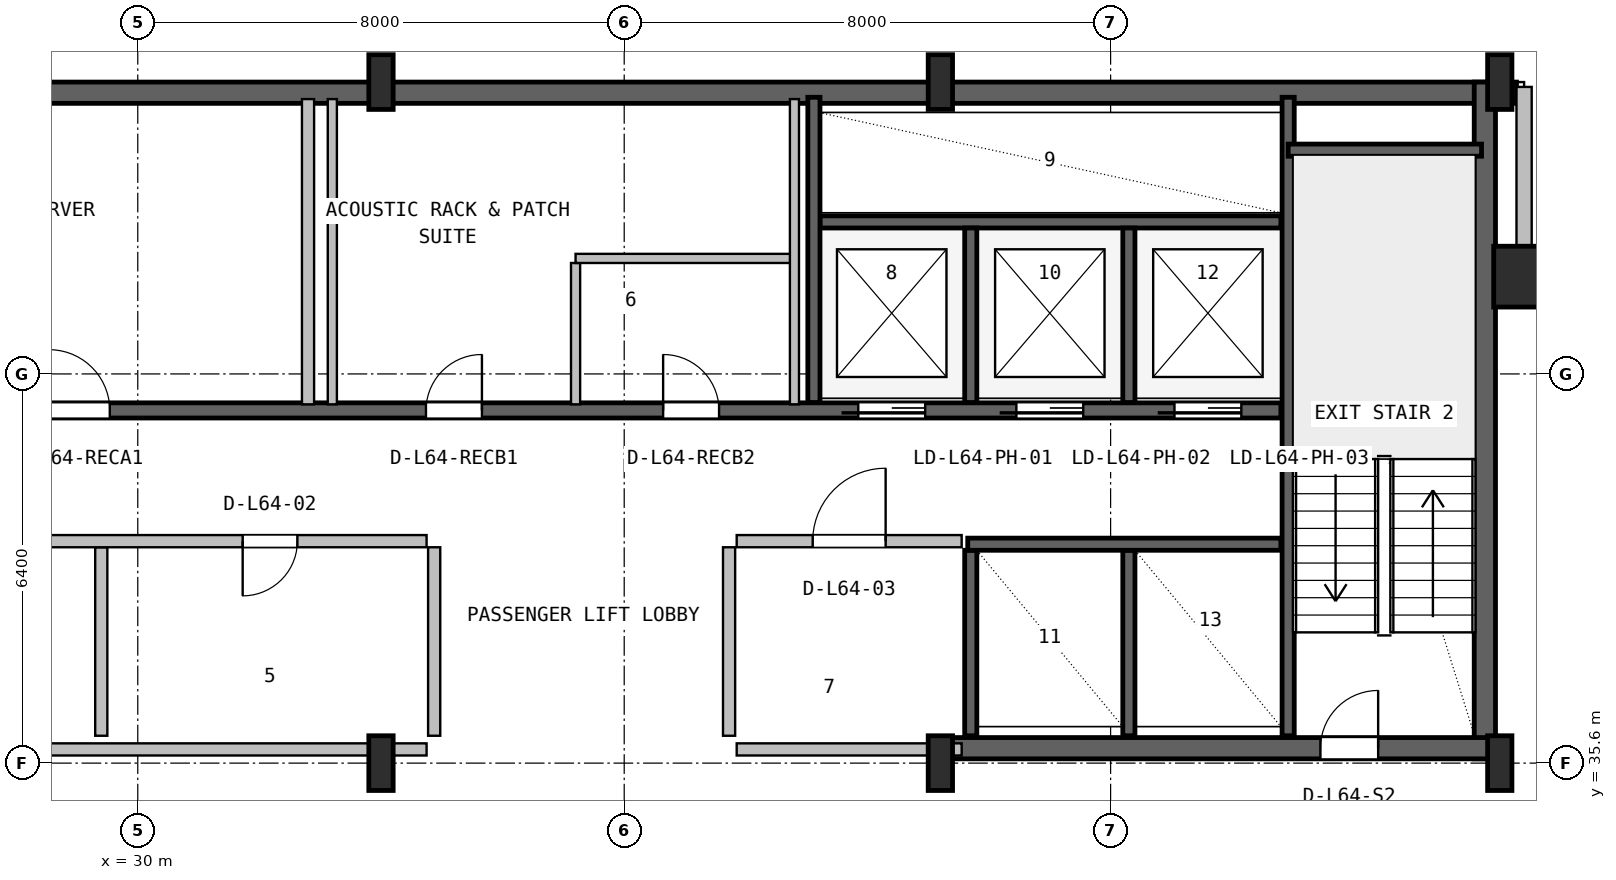
"""IFC4 building model, lengths in metres.
Left out: names, types, materials, properties, quantities, classifications, styles, units other than length and angle.
Written with IfcOpenShell. Run it as: python <this file> out.ifc"""

import sys

from ifc_helpers import new_model, si_unit, direction, frame, frame_2d, origin, origin_2d, place, context, subcontext, project, spatial, rectangle, hollow_rectangle, i_section, extrude, source, transform, mapped, element, fill, save


model = new_model("IFC4")
c1 = context("Model", 3, precision=1e-05, world=origin(), true_north=direction((0.0, 1.0)))
c2 = subcontext(c1, "Body", "Model", "MODEL_VIEW")
j1 = project(units=[si_unit("LENGTHUNIT", "METRE"), si_unit("PLANEANGLEUNIT", "RADIAN")], contexts=[c1])
p1 = place(None, origin())
s1 = spatial("IfcSite", under=j1, at=p1, CompositionType="ELEMENT")
p2 = place(p1, origin())
s2 = spatial("IfcBuilding", under=s1, at=p2, CompositionType="ELEMENT")
p3 = place(p2, frame((0.0, 0.0, 258.4)))
s3 = spatial("IfcBuildingStorey", under=s2, at=p3, CompositionType="ELEMENT", Elevation=258.4)
p4 = place(p3, frame((15.325, 46.625, 0.0), z_axis=(0.0, 0.0, 1.0), x_axis=(1.0, 0.0, 0.0)))
e1 = element("IfcWall", 1, at=p4, inside=s3, PredefinedType="SHEAR", context=c2, shape_type="SweptSolid", body=[
    extrude(rectangle(XDim=37.35, YDim=0.35, at=frame_2d((18.675, 0.0))), origin(), (0.0, 0.0, 1.0), 3.55),
])
p5 = place(p3, frame((52.155, 35.67, 0.0), z_axis=(0.0, 0.0, 1.0), x_axis=(0.0, 1.0, 0.0)))
e2 = element("IfcWall", 2, at=p5, inside=s3, PredefinedType="SHEAR", context=c2, shape_type="SweptSolid", body=[
    extrude(rectangle(XDim=11.13, YDim=0.35, at=frame_2d((5.565, 0.0))), origin(), (0.0, 0.0, 1.0), 3.55),
])
p6 = place(p3, frame((43.2, 35.845, 0.0), z_axis=(0.0, 0.0, 1.0), x_axis=(1.0, 0.0, 0.0)))
e3 = element("IfcWall", 3, at=p6, inside=s3, PredefinedType="SHEAR", context=c2, shape_type="SweptSolid", body=[
    extrude(rectangle(XDim=9.13, YDim=0.35, at=frame_2d((4.565, 0.0))), origin(), (0.0, 0.0, 1.0), 3.55),
])
p7 = place(p6, frame((6.25, 0.0, 0.0)))
e4 = element("IfcOpeningElement", 4, at=p7, cuts=e3, PredefinedType="OPENING", context=c2, shape_type="SweptSolid", body=[
    extrude(rectangle(XDim=0.95, YDim=2.1, at=frame_2d((0.475, 1.05))), frame((0.0, 0.185, 0.0), z_axis=(0.0, -1.0, 0.0), x_axis=(1.0, 0.0, 0.0)), (0.0, 0.0, 1.0), 0.37),
])
m1 = source(origin(), c2, "Body", "SweptSolid", [
    extrude(i_section(OverallWidth=0.4, OverallDepth=0.9, WebThickness=0.016, FlangeThickness=0.028, FilletRadius=0.016, at=origin_2d()), origin(), (0.0, 0.0, 1.0), 3.8),
])
for number, where, z_axis, x_axis in (
    (5, (34.0, 35.6, 0.0), (0.0, 0.0, 1.0), (1.0, 0.0, 0.0)),
    (6, (34.0, 46.8, 0.0), (0.0, 0.0, 1.0), (1.0, 0.0, 0.0)),
    (7, (43.2, 35.6, 0.0), (0.0, 0.0, 1.0), (1.0, 0.0, 0.0)),
    (8, (43.2, 46.8, 0.0), (0.0, 0.0, 1.0), (1.0, 0.0, 0.0)),
    (9, (52.4, 35.6, 0.0), (0.0, 0.0, 1.0), (1.0, 0.0, 0.0)),
    (10, (52.4, 46.8, 0.0), (0.0, 0.0, 1.0), (1.0, 0.0, 0.0)),
):
    element("IfcColumn", number, at=place(p3, frame(where, z_axis=z_axis, x_axis=x_axis)), inside=s3, PredefinedType="COLUMN", context=c2, shape_type="MappedRepresentation", body=[
        mapped(m1, transform((0.0, 0.0, 0.0), x_axis=(1.0, 0.0, 0.0), y_axis=(0.0, 1.0, 0.0), z_axis=(0.0, 0.0, 1.0), scale=1.0)),
    ])
m2 = source(origin(), c2, "Body", "SweptSolid", [
    extrude(hollow_rectangle(XDim=1.0, YDim=1.0, WallThickness=0.04, at=origin_2d()), origin(), (0.0, 0.0, 1.0), 3.8),
])
p8 = place(p3, frame((52.8, 43.6, 0.0), z_axis=(0.0, 0.0, 1.0), x_axis=(1.0, 0.0, 0.0)))
e11 = element("IfcColumn", 11, at=p8, inside=s3, PredefinedType="COLUMN", context=c2, shape_type="MappedRepresentation", body=[
    mapped(m2, transform((0.0, 0.0, 0.0), x_axis=(1.0, 0.0, 0.0), y_axis=(0.0, 1.0, 0.0), z_axis=(0.0, 0.0, 1.0), scale=1.0)),
])
p9 = place(p3, frame((52.93, 43.6, 0.0), z_axis=(0.0, 0.0, 1.0), x_axis=(1.0, 0.0, 0.0)))
e12 = element("IfcWall", 12, at=p9, inside=s3, PredefinedType="SOLIDWALL", context=c2, shape_type="SweptSolid", body=[
    extrude(rectangle(XDim=2.99, YDim=0.25, at=frame_2d((1.495, 0.0))), origin(), (0.0, 0.0, 1.0), 3.53),
])
p10 = place(p3, frame((52.8, 43.52, 0.0), z_axis=(0.0, 0.0, 1.0), x_axis=(0.0, 1.0, 0.0)))
e13 = element("IfcWall", 13, at=p10, inside=s3, PredefinedType="SOLIDWALL", context=c2, shape_type="SweptSolid", body=[
    extrude(rectangle(XDim=3.2, YDim=0.25, at=frame_2d((1.6, 0.0))), origin(), (0.0, 0.0, 1.0), 3.171),
])
p11 = place(p3, frame((48.92, 36.05, 0.0), z_axis=(0.0, 0.0, 1.0), x_axis=(0.0, 1.0, 0.0)))
e14 = element("IfcWall", 14, at=p11, inside=s3, PredefinedType="SHEAR", context=c2, shape_type="SweptSolid", body=[
    extrude(rectangle(XDim=10.5, YDim=0.2, at=frame_2d((5.25, 0.0))), origin(), (0.0, 0.0, 1.0), 3.55),
])
p12 = place(p3, frame((48.92, 45.68, 0.0), z_axis=(0.0, 0.0, 1.0), x_axis=(1.0, 0.0, 0.0)))
e15 = element("IfcWall", 15, at=p12, inside=s3, PredefinedType="SHEAR", context=c2, shape_type="SweptSolid", body=[
    extrude(rectangle(XDim=3.18, YDim=0.2, at=frame_2d((1.59, 0.0))), origin(), (0.0, 0.0, 1.0), 3.55),
])
p13 = place(p3, frame((24.98, 41.4, 0.0), z_axis=(0.0, 0.0, 1.0), x_axis=(1.0, 0.0, 0.0)))
e16 = element("IfcWall", 16, at=p13, inside=s3, PredefinedType="SHEAR", context=c2, shape_type="SweptSolid", body=[
    extrude(rectangle(XDim=23.82, YDim=0.25, at=frame_2d((11.91, 0.0))), origin(), (0.0, 0.0, 1.0), 3.55),
])
p14 = place(p13, frame((16.87, 0.0, 0.0)))
e17 = element("IfcOpeningElement", 17, at=p14, cuts=e16, PredefinedType="OPENING", context=c2, shape_type="SweptSolid", body=[
    extrude(rectangle(XDim=1.1, YDim=2.18, at=frame_2d((0.55, 1.09))), frame((0.0, 0.135, 0.0), z_axis=(0.0, -1.0, 0.0), x_axis=(1.0, 0.0, 0.0)), (0.0, 0.0, 1.0), 0.27),
])
p15 = place(p13, frame((19.47, 0.0, 0.0)))
e18 = element("IfcOpeningElement", 18, at=p15, cuts=e16, PredefinedType="OPENING", context=c2, shape_type="SweptSolid", body=[
    extrude(rectangle(XDim=1.1, YDim=2.18, at=frame_2d((0.55, 1.09))), frame((0.0, 0.135, 0.0), z_axis=(0.0, -1.0, 0.0), x_axis=(1.0, 0.0, 0.0)), (0.0, 0.0, 1.0), 0.27),
])
p16 = place(p13, frame((22.07, 0.0, 0.0)))
e19 = element("IfcOpeningElement", 19, at=p16, cuts=e16, PredefinedType="OPENING", context=c2, shape_type="SweptSolid", body=[
    extrude(rectangle(XDim=1.1, YDim=2.18, at=frame_2d((0.55, 1.09))), frame((0.0, 0.135, 0.0), z_axis=(0.0, -1.0, 0.0), x_axis=(1.0, 0.0, 0.0)), (0.0, 0.0, 1.0), 0.27),
])
p17 = place(p13, frame((3.56, 0.0, 0.0)))
e20 = element("IfcOpeningElement", 20, at=p17, cuts=e16, PredefinedType="OPENING", context=c2, shape_type="SweptSolid", body=[
    extrude(rectangle(XDim=1.0, YDim=2.08, at=frame_2d((0.5, 1.04))), frame((0.0, 0.135, 0.0), z_axis=(0.0, -1.0, 0.0), x_axis=(1.0, 0.0, 0.0)), (0.0, 0.0, 1.0), 0.27),
])
p18 = place(p13, frame((9.76, 0.0, 0.0)))
e21 = element("IfcOpeningElement", 21, at=p18, cuts=e16, PredefinedType="OPENING", context=c2, shape_type="SweptSolid", body=[
    extrude(rectangle(XDim=0.92, YDim=2.08, at=frame_2d((0.46, 1.04))), frame((0.0, 0.135, 0.0), z_axis=(0.0, -1.0, 0.0), x_axis=(1.0, 0.0, 0.0)), (0.0, 0.0, 1.0), 0.27),
])
p19 = place(p13, frame((13.66, 0.0, 0.0)))
e22 = element("IfcOpeningElement", 22, at=p19, cuts=e16, PredefinedType="OPENING", context=c2, shape_type="SweptSolid", body=[
    extrude(rectangle(XDim=0.92, YDim=2.08, at=frame_2d((0.46, 1.04))), frame((0.0, 0.135, 0.0), z_axis=(0.0, -1.0, 0.0), x_axis=(1.0, 0.0, 0.0)), (0.0, 0.0, 1.0), 0.27),
])
p20 = place(p3, frame((41.22, 44.5, 0.0), z_axis=(0.0, 0.0, 1.0), x_axis=(1.0, 0.0, 0.0)))
e23 = element("IfcWall", 23, at=p20, inside=s3, PredefinedType="SHEAR", context=c2, shape_type="SweptSolid", body=[
    extrude(rectangle(XDim=7.58, YDim=0.2, at=frame_2d((3.79, 0.0))), origin(), (0.0, 0.0, 1.0), 3.55),
])
p21 = place(p3, frame((41.12, 41.53, 0.0), z_axis=(0.0, 0.0, 1.0), x_axis=(0.0, 1.0, 0.0)))
e24 = element("IfcWall", 24, at=p21, inside=s3, PredefinedType="SHEAR", context=c2, shape_type="SweptSolid", body=[
    extrude(rectangle(XDim=5.02, YDim=0.2, at=frame_2d((2.51, 0.0))), origin(), (0.0, 0.0, 1.0), 3.55),
])
for number, where, z_axis, x_axis in (
    (25, (43.7, 41.53, 0.0), (0.0, 0.0, 1.0), (0.0, 1.0, 0.0)),
    (26, (46.3, 41.53, 0.0), (0.0, 0.0, 1.0), (0.0, 1.0, 0.0)),
):
    element("IfcWall", number, at=place(p3, frame(where, z_axis=z_axis, x_axis=x_axis)), inside=s3, PredefinedType="SHEAR", context=c2, shape_type="SweptSolid", body=[
        extrude(rectangle(XDim=2.87, YDim=0.2, at=frame_2d((1.435, 0.0))), origin(), (0.0, 0.0, 1.0), 3.55),
    ])
for number, where, z_axis, x_axis in (
    (27, (43.7, 36.05, 0.0), (0.0, 0.0, 1.0), (0.0, 1.0, 0.0)),
    (28, (46.3, 36.05, 0.0), (0.0, 0.0, 1.0), (0.0, 1.0, 0.0)),
):
    element("IfcWall", number, at=place(p3, frame(where, z_axis=z_axis, x_axis=x_axis)), inside=s3, PredefinedType="SHEAR", context=c2, shape_type="SweptSolid", body=[
        extrude(rectangle(XDim=3.05, YDim=0.2, at=frame_2d((1.525, 0.0))), origin(), (0.0, 0.0, 1.0), 3.55),
    ])
p22 = place(p3, frame((43.65, 39.2, 0.0), z_axis=(0.0, 0.0, 1.0), x_axis=(1.0, 0.0, 0.0)))
e29 = element("IfcWall", 29, at=p22, inside=s3, PredefinedType="SHEAR", context=c2, shape_type="SweptSolid", body=[
    extrude(rectangle(XDim=5.15, YDim=0.2, at=frame_2d((2.575, 0.0))), origin(), (0.0, 0.0, 1.0), 3.55),
])
p23 = place(p3, frame((25.0, 35.825, 0.0), z_axis=(0.0, 0.0, 1.0), x_axis=(1.0, 0.0, 0.0)))
e30 = element("IfcWall", 30, at=p23, inside=s3, PredefinedType="PLUMBINGWALL", context=c2, shape_type="SweptSolid", body=[
    extrude(rectangle(XDim=9.75, YDim=0.2, at=frame_2d((4.875, 0.0))), origin(), (0.0, 0.0, 1.0), 2.575),
])
p24 = place(p3, frame((29.4, 36.05, 0.0), z_axis=(0.0, 0.0, 1.0), x_axis=(0.0, 1.0, 0.0)))
e31 = element("IfcWall", 31, at=p24, inside=s3, PredefinedType="PLUMBINGWALL", context=c2, shape_type="SweptSolid", body=[
    extrude(rectangle(XDim=3.1, YDim=0.2, at=frame_2d((1.55, 0.0))), origin(), (0.0, 0.0, 1.0), 3.53),
])
p25 = place(p3, frame((25.0, 39.25, 0.0), z_axis=(0.0, 0.0, 1.0), x_axis=(1.0, 0.0, 0.0)))
e32 = element("IfcWall", 32, at=p25, inside=s3, PredefinedType="PLUMBINGWALL", context=c2, shape_type="SweptSolid", body=[
    extrude(rectangle(XDim=9.75, YDim=0.2, at=frame_2d((4.875, 0.0))), origin(), (0.0, 0.0, 1.0), 3.53),
])
p26 = place(p25, frame((1.75, 0.0, 0.0)))
e33 = element("IfcOpeningElement", 33, at=p26, cuts=e32, PredefinedType="OPENING", context=c2, shape_type="SweptSolid", body=[
    extrude(rectangle(XDim=0.9, YDim=2.06, at=frame_2d((0.45, 1.03))), frame((0.0, 0.11, 0.0), z_axis=(0.0, -1.0, 0.0), x_axis=(1.0, 0.0, 0.0)), (0.0, 0.0, 1.0), 0.22),
])
p27 = place(p25, frame((6.725, 0.0, 0.0)))
e34 = element("IfcOpeningElement", 34, at=p27, cuts=e32, PredefinedType="OPENING", context=c2, shape_type="SweptSolid", body=[
    extrude(rectangle(XDim=0.9, YDim=2.06, at=frame_2d((0.45, 1.03))), frame((0.0, 0.11, 0.0), z_axis=(0.0, -1.0, 0.0), x_axis=(1.0, 0.0, 0.0)), (0.0, 0.0, 1.0), 0.22),
])
p28 = place(p3, frame((34.875, 36.05, 0.0), z_axis=(0.0, 0.0, 1.0), x_axis=(0.0, 1.0, 0.0)))
e35 = element("IfcWall", 35, at=p28, inside=s3, PredefinedType="PLUMBINGWALL", context=c2, shape_type="SweptSolid", body=[
    extrude(rectangle(XDim=3.1, YDim=0.2, at=frame_2d((1.55, 0.0))), origin(), (0.0, 0.0, 1.0), 3.53),
])
p29 = place(p3, frame((39.85, 35.825, 0.0), z_axis=(0.0, 0.0, 1.0), x_axis=(1.0, 0.0, 0.0)))
e36 = element("IfcWall", 36, at=p29, inside=s3, PredefinedType="SOLIDWALL", context=c2, shape_type="SweptSolid", body=[
    extrude(rectangle(XDim=3.7, YDim=0.2, at=frame_2d((1.85, 0.0))), origin(), (0.0, 0.0, 1.0), 2.575),
])
p30 = place(p3, frame((39.85, 39.25, 0.0), z_axis=(0.0, 0.0, 1.0), x_axis=(1.0, 0.0, 0.0)))
e37 = element("IfcWall", 37, at=p30, inside=s3, PredefinedType="SOLIDWALL", context=c2, shape_type="SweptSolid", body=[
    extrude(rectangle(XDim=3.7, YDim=0.2, at=frame_2d((1.85, 0.0))), origin(), (0.0, 0.0, 1.0), 3.53),
])
p31 = place(p30, frame((1.25, 0.0, 0.0)))
e38 = element("IfcOpeningElement", 38, at=p31, cuts=e37, PredefinedType="OPENING", context=c2, shape_type="SweptSolid", body=[
    extrude(rectangle(XDim=1.2, YDim=2.1, at=frame_2d((0.6, 1.05))), frame((0.0, 0.11, 0.0), z_axis=(0.0, -1.0, 0.0), x_axis=(1.0, 0.0, 0.0)), (0.0, 0.0, 1.0), 0.22),
])
p32 = place(p3, frame((39.725, 36.05, 0.0), z_axis=(0.0, 0.0, 1.0), x_axis=(0.0, 1.0, 0.0)))
e39 = element("IfcWall", 39, at=p32, inside=s3, PredefinedType="SOLIDWALL", context=c2, shape_type="SweptSolid", body=[
    extrude(rectangle(XDim=3.1, YDim=0.2, at=frame_2d((1.55, 0.0))), origin(), (0.0, 0.0, 1.0), 3.53),
])
p33 = place(p3, frame((32.8, 41.5, 0.0), z_axis=(0.0, 0.0, 1.0), x_axis=(0.0, 1.0, 0.0)))
e40 = element("IfcWall", 40, at=p33, inside=s3, PredefinedType="SOLIDWALL", context=c2, shape_type="SweptSolid", body=[
    extrude(rectangle(XDim=5.02, YDim=0.2, at=frame_2d((2.51, 0.0))), origin(), (0.0, 0.0, 1.0), 3.53),
])
p34 = place(p3, frame((37.2, 41.5, 0.0), z_axis=(0.0, 0.0, 1.0), x_axis=(0.0, 1.0, 0.0)))
e41 = element("IfcWall", 41, at=p34, inside=s3, PredefinedType="PARTITIONING", context=c2, shape_type="SweptSolid", body=[
    extrude(rectangle(XDim=2.325, YDim=0.15, at=frame_2d((1.163, 0.0))), origin(), (0.0, 0.0, 1.0), 3.53),
])
p35 = place(p3, frame((37.2, 43.9, 0.0), z_axis=(0.0, 0.0, 1.0), x_axis=(1.0, 0.0, 0.0)))
e42 = element("IfcWall", 42, at=p35, inside=s3, PredefinedType="PARTITIONING", context=c2, shape_type="SweptSolid", body=[
    extrude(rectangle(XDim=3.6, YDim=0.15, at=frame_2d((1.8, 0.0))), origin(), (0.0, 0.0, 1.0), 3.53),
])
for number, where, z_axis, x_axis in (
    (43, (40.8, 41.5, 0.0), (0.0, 0.0, 1.0), (0.0, 1.0, 0.0)),
    (44, (33.2, 41.5, 0.0), (0.0, 0.0, 1.0), (0.0, 1.0, 0.0)),
):
    element("IfcWall", number, at=place(p3, frame(where, z_axis=z_axis, x_axis=x_axis)), inside=s3, PredefinedType="PARTITIONING", context=c2, shape_type="SweptSolid", body=[
        extrude(rectangle(XDim=5.02, YDim=0.15, at=frame_2d((2.51, 0.0))), origin(), (0.0, 0.0, 1.0), 3.53),
    ])
m3 = source(origin(), c2, "Body", "SweptSolid", [
    extrude(rectangle(XDim=0.95, YDim=2.1, at=frame_2d((0.475, 1.05))), frame((0.0, 0.025, 0.0), z_axis=(0.0, -1.0, 0.0), x_axis=(1.0, 0.0, 0.0)), (0.0, 0.0, 1.0), 0.05),
])
p36 = place(p7, origin())
e45 = element("IfcDoor", 45, at=p36, inside=s3, OperationType="SINGLE_SWING_RIGHT", PredefinedType="DOOR", context=c2, shape_type="MappedRepresentation", body=[
    mapped(m3, transform((0.0, 0.0, 0.0), x_axis=(1.0, 0.0, 0.0), y_axis=(0.0, 1.0, 0.0), z_axis=(0.0, 0.0, 1.0), scale=1.0)),
])
fill(e4, e45)
m4 = source(origin(), c2, "Body", "SweptSolid", [
    extrude(rectangle(XDim=1.1, YDim=2.18, at=frame_2d((0.55, 1.09))), frame((0.0, 0.025, 0.0), z_axis=(0.0, -1.0, 0.0), x_axis=(1.0, 0.0, 0.0)), (0.0, 0.0, 1.0), 0.05),
])
p37 = place(p14, frame((1.1, 0.0, 0.0), z_axis=(0.0, 0.0, 1.0), x_axis=(-1.0, 0.0, 0.0)))
e46 = element("IfcDoor", 46, at=p37, inside=s3, OperationType="SLIDING_TO_LEFT", PredefinedType="DOOR", context=c2, shape_type="MappedRepresentation", body=[
    mapped(m4, transform((0.0, 0.0, 0.0), x_axis=(1.0, 0.0, 0.0), y_axis=(0.0, 1.0, 0.0), z_axis=(0.0, 0.0, 1.0), scale=1.0)),
])
fill(e17, e46)
p38 = place(p15, frame((1.1, 0.0, 0.0), z_axis=(0.0, 0.0, 1.0), x_axis=(-1.0, 0.0, 0.0)))
e47 = element("IfcDoor", 47, at=p38, inside=s3, OperationType="SLIDING_TO_LEFT", PredefinedType="DOOR", context=c2, shape_type="MappedRepresentation", body=[
    mapped(m4, transform((0.0, 0.0, 0.0), x_axis=(1.0, 0.0, 0.0), y_axis=(0.0, 1.0, 0.0), z_axis=(0.0, 0.0, 1.0), scale=1.0)),
])
fill(e18, e47)
p39 = place(p16, frame((1.1, 0.0, 0.0), z_axis=(0.0, 0.0, 1.0), x_axis=(-1.0, 0.0, 0.0)))
e48 = element("IfcDoor", 48, at=p39, inside=s3, OperationType="SLIDING_TO_LEFT", PredefinedType="DOOR", context=c2, shape_type="MappedRepresentation", body=[
    mapped(m4, transform((0.0, 0.0, 0.0), x_axis=(1.0, 0.0, 0.0), y_axis=(0.0, 1.0, 0.0), z_axis=(0.0, 0.0, 1.0), scale=1.0)),
])
fill(e19, e48)
m5 = source(origin(), c2, "Body", "SweptSolid", [
    extrude(rectangle(XDim=1.0, YDim=2.08, at=frame_2d((0.5, 1.04))), frame((0.0, 0.025, 0.0), z_axis=(0.0, -1.0, 0.0), x_axis=(1.0, 0.0, 0.0)), (0.0, 0.0, 1.0), 0.05),
])
p40 = place(p17, origin())
e49 = element("IfcDoor", 49, at=p40, inside=s3, OperationType="SINGLE_SWING_LEFT", PredefinedType="DOOR", context=c2, shape_type="MappedRepresentation", body=[
    mapped(m5, transform((0.0, 0.0, 0.0), x_axis=(1.0, 0.0, 0.0), y_axis=(0.0, 1.0, 0.0), z_axis=(0.0, 0.0, 1.0), scale=1.0)),
])
fill(e20, e49)
m6 = source(origin(), c2, "Body", "SweptSolid", [
    extrude(rectangle(XDim=0.92, YDim=2.08, at=frame_2d((0.46, 1.04))), frame((0.0, 0.025, 0.0), z_axis=(0.0, -1.0, 0.0), x_axis=(1.0, 0.0, 0.0)), (0.0, 0.0, 1.0), 0.05),
])
p41 = place(p18, origin())
e50 = element("IfcDoor", 50, at=p41, inside=s3, OperationType="SINGLE_SWING_RIGHT", PredefinedType="DOOR", context=c2, shape_type="MappedRepresentation", body=[
    mapped(m6, transform((0.0, 0.0, 0.0), x_axis=(1.0, 0.0, 0.0), y_axis=(0.0, 1.0, 0.0), z_axis=(0.0, 0.0, 1.0), scale=1.0)),
])
fill(e21, e50)
p42 = place(p19, origin())
e51 = element("IfcDoor", 51, at=p42, inside=s3, OperationType="SINGLE_SWING_LEFT", PredefinedType="DOOR", context=c2, shape_type="MappedRepresentation", body=[
    mapped(m6, transform((0.0, 0.0, 0.0), x_axis=(1.0, 0.0, 0.0), y_axis=(0.0, 1.0, 0.0), z_axis=(0.0, 0.0, 1.0), scale=1.0)),
])
fill(e22, e51)
m7 = source(origin(), c2, "Body", "SweptSolid", [
    extrude(rectangle(XDim=0.9, YDim=2.06, at=frame_2d((0.45, 1.03))), frame((0.0, 0.025, 0.0), z_axis=(0.0, -1.0, 0.0), x_axis=(1.0, 0.0, 0.0)), (0.0, 0.0, 1.0), 0.05),
])
p43 = place(p27, frame((0.9, 0.0, 0.0), z_axis=(0.0, 0.0, 1.0), x_axis=(-1.0, 0.0, 0.0)))
e52 = element("IfcDoor", 52, at=p43, inside=s3, OperationType="SINGLE_SWING_LEFT", PredefinedType="DOOR", context=c2, shape_type="MappedRepresentation", body=[
    mapped(m7, transform((0.0, 0.0, 0.0), x_axis=(1.0, 0.0, 0.0), y_axis=(0.0, 1.0, 0.0), z_axis=(0.0, 0.0, 1.0), scale=1.0)),
])
fill(e34, e52)
m8 = source(origin(), c2, "Body", "SweptSolid", [
    extrude(rectangle(XDim=1.2, YDim=2.1, at=frame_2d((0.6, 1.05))), frame((0.0, 0.025, 0.0), z_axis=(0.0, -1.0, 0.0), x_axis=(1.0, 0.0, 0.0)), (0.0, 0.0, 1.0), 0.05),
])
p44 = place(p31, origin())
e53 = element("IfcDoor", 53, at=p44, inside=s3, OperationType="SINGLE_SWING_RIGHT", PredefinedType="DOOR", context=c2, shape_type="MappedRepresentation", body=[
    mapped(m8, transform((0.0, 0.0, 0.0), x_axis=(1.0, 0.0, 0.0), y_axis=(0.0, 1.0, 0.0), z_axis=(0.0, 0.0, 1.0), scale=1.0)),
])
fill(e38, e53)
save(model, sys.argv[1])
